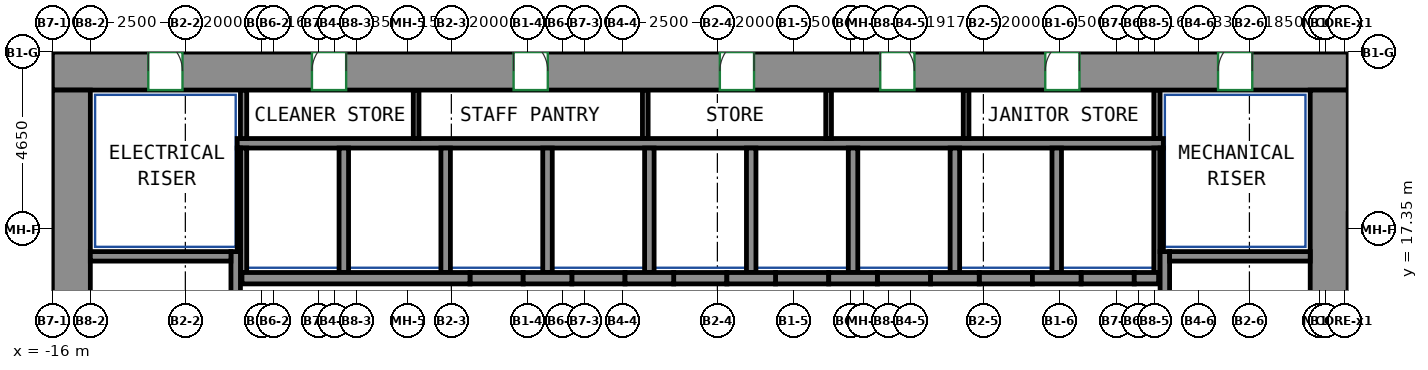
"""IFC4 building model, lengths in metres.
Left out: names, types, materials, properties, quantities, classifications, styles, units other than length and angle.
Written with IfcOpenShell. Run it as: python <this file> out.ifc"""

import sys

from ifc_helpers import new_model, si_unit, direction, frame, frame_2d, origin, place, context, subcontext, project, spatial, rectangle, extrude, source, transform, mapped, element, fill, save


model = new_model("IFC4")
c1 = context("Model", 3, precision=1e-05, world=origin(), true_north=direction((0.0, 1.0)))
c2 = subcontext(c1, "Body", "Model", "MODEL_VIEW")
j1 = project(units=[si_unit("LENGTHUNIT", "METRE"), si_unit("PLANEANGLEUNIT", "RADIAN")], contexts=[c1])
p1 = place(None, origin())
s1 = spatial("IfcSite", under=j1, at=p1, CompositionType="ELEMENT")
p2 = place(p1, origin())
s2 = spatial("IfcBuilding", under=s1, at=p2, CompositionType="ELEMENT")
p3 = place(p2, frame((0.0, 0.0, 95.2)))
s3 = spatial("IfcBuildingStorey", under=s2, at=p3, CompositionType="ELEMENT", Elevation=95.2)
m1 = source(origin(), c2, "Body", "SweptSolid", [
    extrude(rectangle(XDim=34.1, YDim=1.0, at=frame_2d((17.05, 0.0))), origin(), (0.0, 0.0, 1.0), 5.0),
])
p4 = place(p3, frame((-16.0, 21.5, 0.0), z_axis=(0.0, 0.0, 1.0), x_axis=(1.0, 0.0, 0.0)))
e1 = element("IfcWall", 1, at=p4, inside=s3, PredefinedType="SHEAR", context=c2, shape_type="MappedRepresentation", body=[
    mapped(m1, transform((0.0, 0.0, 0.0))),
])
p5 = place(p4, frame((6.831, 0.0, 0.0)))
e2 = element("IfcOpeningElement", 2, at=p5, cuts=e1, PredefinedType="OPENING", context=c2, shape_type="SweptSolid", body=[
    extrude(rectangle(XDim=0.9, YDim=2.1, at=frame_2d((0.45, 1.05))), frame((0.0, 0.51, 0.0), z_axis=(0.0, -1.0, 0.0), x_axis=(1.0, 0.0, 0.0)), (0.0, 0.0, 1.0), 1.02),
])
p6 = place(p4, frame((12.138, 0.0, 0.0)))
e3 = element("IfcOpeningElement", 3, at=p6, cuts=e1, PredefinedType="OPENING", context=c2, shape_type="SweptSolid", body=[
    extrude(rectangle(XDim=0.9, YDim=2.1, at=frame_2d((0.45, 1.05))), frame((0.0, 0.51, 0.0), z_axis=(0.0, -1.0, 0.0), x_axis=(1.0, 0.0, 0.0)), (0.0, 0.0, 1.0), 1.02),
])
p7 = place(p4, frame((17.565, 0.0, 0.0)))
e4 = element("IfcOpeningElement", 4, at=p7, cuts=e1, PredefinedType="OPENING", context=c2, shape_type="SweptSolid", body=[
    extrude(rectangle(XDim=0.9, YDim=2.1, at=frame_2d((0.45, 1.05))), frame((0.0, 0.51, 0.0), z_axis=(0.0, -1.0, 0.0), x_axis=(1.0, 0.0, 0.0)), (0.0, 0.0, 1.0), 1.02),
])
p8 = place(p4, frame((21.786, 0.0, 0.0)))
e5 = element("IfcOpeningElement", 5, at=p8, cuts=e1, PredefinedType="OPENING", context=c2, shape_type="SweptSolid", body=[
    extrude(rectangle(XDim=0.9, YDim=2.1, at=frame_2d((0.45, 1.05))), frame((0.0, 0.51, 0.0), z_axis=(0.0, -1.0, 0.0), x_axis=(1.0, 0.0, 0.0)), (0.0, 0.0, 1.0), 1.02),
])
p9 = place(p4, frame((26.127, 0.0, 0.0)))
e6 = element("IfcOpeningElement", 6, at=p9, cuts=e1, PredefinedType="OPENING", context=c2, shape_type="SweptSolid", body=[
    extrude(rectangle(XDim=0.9, YDim=2.1, at=frame_2d((0.45, 1.05))), frame((0.0, 0.51, 0.0), z_axis=(0.0, -1.0, 0.0), x_axis=(1.0, 0.0, 0.0)), (0.0, 0.0, 1.0), 1.02),
])
p10 = place(p4, frame((2.525, 0.0, 0.0)))
e7 = element("IfcOpeningElement", 7, at=p10, cuts=e1, PredefinedType="OPENING", context=c2, shape_type="SweptSolid", body=[
    extrude(rectangle(XDim=0.9, YDim=2.1, at=frame_2d((0.45, 1.05))), frame((0.0, 0.51, 0.0), z_axis=(0.0, -1.0, 0.0), x_axis=(1.0, 0.0, 0.0)), (0.0, 0.0, 1.0), 1.02),
])
p11 = place(p4, frame((30.675, 0.0, 0.0)))
e8 = element("IfcOpeningElement", 8, at=p11, cuts=e1, PredefinedType="OPENING", context=c2, shape_type="SweptSolid", body=[
    extrude(rectangle(XDim=0.9, YDim=2.1, at=frame_2d((0.45, 1.05))), frame((0.0, 0.51, 0.0), z_axis=(0.0, -1.0, 0.0), x_axis=(1.0, 0.0, 0.0)), (0.0, 0.0, 1.0), 1.02),
])
m2 = source(origin(), c2, "Body", "SweptSolid", [
    extrude(rectangle(XDim=12.0, YDim=1.0, at=frame_2d((6.0, 0.0))), origin(), (0.0, 0.0, 1.0), 5.0),
])
for number, where, z_axis, x_axis in (
    (9, (-15.5, 9.0, 0.0), (0.0, 0.0, 1.0), (0.0, 1.0, 0.0)),
    (10, (17.6, 9.0, 0.0), (0.0, 0.0, 1.0), (0.0, 1.0, 0.0)),
):
    element("IfcWall", number, at=place(p3, frame(where, z_axis=z_axis, x_axis=x_axis)), inside=s3, PredefinedType="SHEAR", context=c2, shape_type="MappedRepresentation", body=[
        mapped(m2, transform((0.0, 0.0, 0.0))),
    ])
m3 = source(origin(), c2, "Body", "SweptSolid", [
    extrude(rectangle(XDim=7.75, YDim=0.25, at=frame_2d((3.875, 0.0))), origin(), (0.0, 0.0, 1.0), 5.0),
])
p12 = place(p3, frame((-11.175, 9.0, 0.0), z_axis=(0.0, 0.0, 1.0), x_axis=(0.0, 1.0, 0.0)))
e11 = element("IfcWall", 11, at=p12, inside=s3, PredefinedType="SHEAR", context=c2, shape_type="MappedRepresentation", body=[
    mapped(m3, transform((0.0, 0.0, 0.0))),
])
m4 = source(origin(), c2, "Body", "SweptSolid", [
    extrude(rectangle(XDim=3.7, YDim=0.25, at=frame_2d((1.85, 0.0))), origin(), (0.0, 0.0, 1.0), 5.0),
])
p13 = place(p3, frame((-15.0, 16.625, 0.0), z_axis=(0.0, 0.0, 1.0), x_axis=(1.0, 0.0, 0.0)))
e12 = element("IfcWall", 12, at=p13, inside=s3, PredefinedType="SHEAR", context=c2, shape_type="MappedRepresentation", body=[
    mapped(m4, transform((0.0, 0.0, 0.0))),
])
p14 = place(p3, frame((13.275, 9.0, 0.0), z_axis=(0.0, 0.0, 1.0), x_axis=(0.0, 1.0, 0.0)))
e13 = element("IfcWall", 13, at=p14, inside=s3, PredefinedType="SHEAR", context=c2, shape_type="MappedRepresentation", body=[
    mapped(m3, transform((0.0, 0.0, 0.0))),
])
m5 = source(origin(), c2, "Body", "SweptSolid", [
    extrude(rectangle(XDim=3.7, YDim=0.25, at=frame_2d((1.85, 0.0))), origin(), (0.0, 0.0, 1.0), 5.0),
])
p15 = place(p3, frame((13.4, 16.625, 0.0), z_axis=(0.0, 0.0, 1.0), x_axis=(1.0, 0.0, 0.0)))
e14 = element("IfcWall", 14, at=p15, inside=s3, PredefinedType="SHEAR", context=c2, shape_type="MappedRepresentation", body=[
    mapped(m5, transform((0.0, 0.0, 0.0))),
])
m6 = source(origin(), c2, "Body", "SweptSolid", [
    extrude(rectangle(XDim=6.0, YDim=0.3, at=frame_2d((3.0, 0.0))), origin(), (0.0, 0.0, 1.0), 5.0),
])
p16 = place(p3, frame((-11.01, 16.05, 0.0), z_axis=(0.0, 0.0, 1.0), x_axis=(1.0, 0.0, 0.0)))
e15 = element("IfcWall", 15, at=p16, inside=s3, PredefinedType="SHEAR", context=c2, shape_type="MappedRepresentation", body=[
    mapped(m6, transform((0.0, 0.0, 0.0))),
])
m7 = source(origin(), c2, "Body", "SweptSolid", [
    extrude(rectangle(XDim=1.28, YDim=0.3, at=frame_2d((0.64, 0.0))), origin(), (0.0, 0.0, 1.0), 5.0),
])
for number, where, z_axis, x_axis in (
    (16, (-3.61, 16.05, 0.0), (0.0, 0.0, 1.0), (1.0, 0.0, 0.0)),
    (17, (-0.93, 16.05, 0.0), (0.0, 0.0, 1.0), (1.0, 0.0, 0.0)),
    (18, (1.75, 16.05, 0.0), (0.0, 0.0, 1.0), (1.0, 0.0, 0.0)),
    (19, (4.43, 16.05, 0.0), (0.0, 0.0, 1.0), (1.0, 0.0, 0.0)),
):
    element("IfcWall", number, at=place(p3, frame(where, z_axis=z_axis, x_axis=x_axis)), inside=s3, PredefinedType="SHEAR", context=c2, shape_type="MappedRepresentation", body=[
        mapped(m7, transform((0.0, 0.0, 0.0))),
    ])
m8 = source(origin(), c2, "Body", "SweptSolid", [
    extrude(rectangle(XDim=1.28, YDim=0.3, at=frame_2d((0.64, 0.0))), origin(), (0.0, 0.0, 1.0), 5.0),
])
p17 = place(p3, frame((7.11, 16.05, 0.0), z_axis=(0.0, 0.0, 1.0), x_axis=(1.0, 0.0, 0.0)))
e20 = element("IfcWall", 20, at=p17, inside=s3, PredefinedType="SHEAR", context=c2, shape_type="MappedRepresentation", body=[
    mapped(m8, transform((0.0, 0.0, 0.0))),
])
p18 = place(p3, frame((9.79, 16.05, 0.0), z_axis=(0.0, 0.0, 1.0), x_axis=(1.0, 0.0, 0.0)))
e21 = element("IfcWall", 21, at=p18, inside=s3, PredefinedType="SHEAR", context=c2, shape_type="MappedRepresentation", body=[
    mapped(m7, transform((0.0, 0.0, 0.0))),
])
m9 = source(origin(), c2, "Body", "SweptSolid", [
    extrude(rectangle(XDim=0.64, YDim=0.3, at=frame_2d((0.32, 0.0))), origin(), (0.0, 0.0, 1.0), 5.0),
])
p19 = place(p3, frame((12.47, 16.05, 0.0), z_axis=(0.0, 0.0, 1.0), x_axis=(1.0, 0.0, 0.0)))
e22 = element("IfcWall", 22, at=p19, inside=s3, PredefinedType="SHEAR", context=c2, shape_type="MappedRepresentation", body=[
    mapped(m9, transform((0.0, 0.0, 0.0))),
])
m10 = source(origin(), c2, "Body", "SweptSolid", [
    extrude(rectangle(XDim=1.4, YDim=0.3, at=frame_2d((0.7, 0.0))), origin(), (0.0, 0.0, 1.0), 5.0),
])
for number, where, z_axis, x_axis in (
    (23, (11.07, 16.05, 0.0), (0.0, 0.0, 1.0), (1.0, 0.0, 0.0)),
    (24, (-5.01, 16.05, 0.0), (0.0, 0.0, 1.0), (1.0, 0.0, 0.0)),
):
    element("IfcWall", number, at=place(p3, frame(where, z_axis=z_axis, x_axis=x_axis)), inside=s3, PredefinedType="PARTITIONING", context=c2, shape_type="MappedRepresentation", body=[
        mapped(m10, transform((0.0, 0.0, 0.0))),
    ])
m11 = source(origin(), c2, "Body", "SweptSolid", [
    extrude(rectangle(XDim=1.4, YDim=0.3, at=frame_2d((0.7, 0.0))), origin(), (0.0, 0.0, 1.0), 5.0),
])
p20 = place(p3, frame((-2.33, 16.05, 0.0), z_axis=(0.0, 0.0, 1.0), x_axis=(1.0, 0.0, 0.0)))
e25 = element("IfcWall", 25, at=p20, inside=s3, PredefinedType="PARTITIONING", context=c2, shape_type="MappedRepresentation", body=[
    mapped(m11, transform((0.0, 0.0, 0.0))),
])
for number, where, z_axis, x_axis in (
    (26, (0.35, 16.05, 0.0), (0.0, 0.0, 1.0), (1.0, 0.0, 0.0)),
    (27, (3.03, 16.05, 0.0), (0.0, 0.0, 1.0), (1.0, 0.0, 0.0)),
):
    element("IfcWall", number, at=place(p3, frame(where, z_axis=z_axis, x_axis=x_axis)), inside=s3, PredefinedType="PARTITIONING", context=c2, shape_type="MappedRepresentation", body=[
        mapped(m10, transform((0.0, 0.0, 0.0))),
    ])
for number, where, z_axis, x_axis in (
    (28, (5.71, 16.05, 0.0), (0.0, 0.0, 1.0), (1.0, 0.0, 0.0)),
    (29, (8.39, 16.05, 0.0), (0.0, 0.0, 1.0), (1.0, 0.0, 0.0)),
):
    element("IfcWall", number, at=place(p3, frame(where, z_axis=z_axis, x_axis=x_axis)), inside=s3, PredefinedType="PARTITIONING", context=c2, shape_type="MappedRepresentation", body=[
        mapped(m11, transform((0.0, 0.0, 0.0))),
    ])
m12 = source(origin(), c2, "Body", "SweptSolid", [
    extrude(rectangle(XDim=24.37, YDim=0.25, at=frame_2d((12.185, 0.0))), origin(), (0.0, 0.0, 1.0), 5.0),
])
p21 = place(p3, frame((-11.135, 19.6, 0.0), z_axis=(0.0, 0.0, 1.0), x_axis=(1.0, 0.0, 0.0)))
e30 = element("IfcWall", 30, at=p21, inside=s3, PredefinedType="PARTITIONING", context=c2, shape_type="MappedRepresentation", body=[
    mapped(m12, transform((0.0, 0.0, 0.0))),
])
m13 = source(origin(), c2, "Body", "SweptSolid", [
    extrude(rectangle(XDim=3.275, YDim=0.165, at=frame_2d((1.638, 0.0))), origin(), (0.0, 0.0, 1.0), 5.0),
])
p22 = place(p3, frame((13.067, 16.2, 0.0), z_axis=(0.0, 0.0, 1.0), x_axis=(0.0, 1.0, 0.0)))
e31 = element("IfcWall", 31, at=p22, inside=s3, PredefinedType="PARTITIONING", context=c2, shape_type="MappedRepresentation", body=[
    mapped(m13, transform((0.0, 0.0, 0.0))),
])
m14 = source(origin(), c2, "Body", "SweptSolid", [
    extrude(rectangle(XDim=1.275, YDim=0.165, at=frame_2d((0.637, 0.0))), origin(), (0.0, 0.0, 1.0), 5.0),
])
p23 = place(p3, frame((13.067, 19.725, 0.0), z_axis=(0.0, 0.0, 1.0), x_axis=(0.0, 1.0, 0.0)))
e32 = element("IfcWall", 32, at=p23, inside=s3, PredefinedType="PARTITIONING", context=c2, shape_type="MappedRepresentation", body=[
    mapped(m14, transform((0.0, 0.0, 0.0))),
])
p24 = place(p3, frame((-10.968, 16.2, 0.0), z_axis=(0.0, 0.0, 1.0), x_axis=(0.0, 1.0, 0.0)))
e33 = element("IfcWall", 33, at=p24, inside=s3, PredefinedType="PARTITIONING", context=c2, shape_type="MappedRepresentation", body=[
    mapped(m13, transform((0.0, 0.0, 0.0))),
])
p25 = place(p3, frame((-10.968, 19.725, 0.0), z_axis=(0.0, 0.0, 1.0), x_axis=(0.0, 1.0, 0.0)))
e34 = element("IfcWall", 34, at=p25, inside=s3, PredefinedType="PARTITIONING", context=c2, shape_type="MappedRepresentation", body=[
    mapped(m14, transform((0.0, 0.0, 0.0))),
])
m15 = source(origin(), c2, "Body", "SweptSolid", [
    extrude(rectangle(XDim=3.275, YDim=0.25, at=frame_2d((1.638, 0.0))), origin(), (0.0, 0.0, 1.0), 5.0),
])
p26 = place(p3, frame((10.43, 16.2, 0.0), z_axis=(0.0, 0.0, 1.0), x_axis=(0.0, 1.0, 0.0)))
e35 = element("IfcWall", 35, at=p26, inside=s3, PredefinedType="PARTITIONING", context=c2, shape_type="MappedRepresentation", body=[
    mapped(m15, transform((0.0, 0.0, 0.0))),
])
m16 = source(origin(), c2, "Body", "SweptSolid", [
    extrude(rectangle(XDim=2.725, YDim=0.085, at=frame_2d((1.363, 0.0))), origin(), (0.0, 0.0, 1.0), 5.0),
])
p27 = place(p3, frame((13.192, 16.75, 0.0), z_axis=(0.0, 0.0, 1.0), x_axis=(0.0, 1.0, 0.0)))
e36 = element("IfcWall", 36, at=p27, inside=s3, PredefinedType="PARTITIONING", context=c2, shape_type="MappedRepresentation", body=[
    mapped(m16, transform((0.0, 0.0, 0.0))),
])
for number, where, z_axis, x_axis in (
    (37, (2.39, 16.2, 0.0), (0.0, 0.0, 1.0), (0.0, 1.0, 0.0)),
    (38, (5.07, 16.2, 0.0), (0.0, 0.0, 1.0), (0.0, 1.0, 0.0)),
    (39, (7.75, 16.2, 0.0), (0.0, 0.0, 1.0), (0.0, 1.0, 0.0)),
    (40, (-0.29, 16.2, 0.0), (0.0, 0.0, 1.0), (0.0, 1.0, 0.0)),
):
    element("IfcWall", number, at=place(p3, frame(where, z_axis=z_axis, x_axis=x_axis)), inside=s3, PredefinedType="PARTITIONING", context=c2, shape_type="MappedRepresentation", body=[
        mapped(m15, transform((0.0, 0.0, 0.0))),
    ])
p28 = place(p3, frame((-11.093, 16.75, 0.0), z_axis=(0.0, 0.0, 1.0), x_axis=(0.0, 1.0, 0.0)))
e41 = element("IfcWall", 41, at=p28, inside=s3, PredefinedType="PARTITIONING", context=c2, shape_type="MappedRepresentation", body=[
    mapped(m16, transform((0.0, 0.0, 0.0))),
])
for number, where, z_axis, x_axis in (
    (42, (-2.97, 16.2, 0.0), (0.0, 0.0, 1.0), (0.0, 1.0, 0.0)),
    (43, (-5.65, 16.2, 0.0), (0.0, 0.0, 1.0), (0.0, 1.0, 0.0)),
    (44, (-8.33, 16.2, 0.0), (0.0, 0.0, 1.0), (0.0, 1.0, 0.0)),
):
    element("IfcWall", number, at=place(p3, frame(where, z_axis=z_axis, x_axis=x_axis)), inside=s3, PredefinedType="PARTITIONING", context=c2, shape_type="MappedRepresentation", body=[
        mapped(m15, transform((0.0, 0.0, 0.0))),
    ])
m17 = source(origin(), c2, "Body", "SweptSolid", [
    extrude(rectangle(XDim=1.275, YDim=0.15, at=frame_2d((0.637, 0.0))), origin(), (0.0, 0.0, 1.0), 5.0),
])
for number, where, z_axis, x_axis in (
    (45, (-6.427, 19.725, 0.0), (0.0, 0.0, 1.0), (0.0, 1.0, 0.0)),
    (46, (-0.397, 19.725, 0.0), (0.0, 0.0, 1.0), (0.0, 1.0, 0.0)),
    (47, (4.427, 19.725, 0.0), (0.0, 0.0, 1.0), (0.0, 1.0, 0.0)),
    (48, (8.045, 19.725, 0.0), (0.0, 0.0, 1.0), (0.0, 1.0, 0.0)),
):
    element("IfcWall", number, at=place(p3, frame(where, z_axis=z_axis, x_axis=x_axis)), inside=s3, PredefinedType="PARTITIONING", context=c2, shape_type="MappedRepresentation", body=[
        mapped(m17, transform((0.0, 0.0, 0.0))),
    ])
p29 = place(p5, origin())
e49 = element("IfcDoor", 49, at=p29, inside=s3, OperationType="SINGLE_SWING_RIGHT", PredefinedType="DOOR", context=c2, shape_type="SweptSolid", body=[
    extrude(rectangle(XDim=0.9, YDim=2.1, at=frame_2d((0.45, 1.05))), frame((0.0, -0.355, 0.0), z_axis=(0.0, -1.0, 0.0), x_axis=(1.0, 0.0, 0.0)), (0.0, 0.0, 1.0), 0.05),
])
fill(e2, e49)
p30 = place(p6, origin())
e50 = element("IfcDoor", 50, at=p30, inside=s3, OperationType="SINGLE_SWING_LEFT", PredefinedType="DOOR", context=c2, shape_type="SweptSolid", body=[
    extrude(rectangle(XDim=0.9, YDim=2.1, at=frame_2d((0.45, 1.05))), frame((0.0, -0.355, 0.0), z_axis=(0.0, -1.0, 0.0), x_axis=(1.0, 0.0, 0.0)), (0.0, 0.0, 1.0), 0.05),
])
fill(e3, e50)
p31 = place(p7, origin())
e51 = element("IfcDoor", 51, at=p31, inside=s3, OperationType="SINGLE_SWING_RIGHT", PredefinedType="DOOR", context=c2, shape_type="SweptSolid", body=[
    extrude(rectangle(XDim=0.9, YDim=2.1, at=frame_2d((0.45, 1.05))), frame((0.0, -0.355, 0.0), z_axis=(0.0, -1.0, 0.0), x_axis=(1.0, 0.0, 0.0)), (0.0, 0.0, 1.0), 0.05),
])
fill(e4, e51)
p32 = place(p8, origin())
e52 = element("IfcDoor", 52, at=p32, inside=s3, OperationType="SINGLE_SWING_LEFT", PredefinedType="DOOR", context=c2, shape_type="SweptSolid", body=[
    extrude(rectangle(XDim=0.9, YDim=2.1, at=frame_2d((0.45, 1.05))), frame((0.0, -0.355, 0.0), z_axis=(0.0, -1.0, 0.0), x_axis=(1.0, 0.0, 0.0)), (0.0, 0.0, 1.0), 0.05),
])
fill(e5, e52)
p33 = place(p9, origin())
e53 = element("IfcDoor", 53, at=p33, inside=s3, OperationType="SINGLE_SWING_RIGHT", PredefinedType="DOOR", context=c2, shape_type="SweptSolid", body=[
    extrude(rectangle(XDim=0.9, YDim=2.1, at=frame_2d((0.45, 1.05))), frame((0.0, -0.355, 0.0), z_axis=(0.0, -1.0, 0.0), x_axis=(1.0, 0.0, 0.0)), (0.0, 0.0, 1.0), 0.05),
])
fill(e6, e53)
p34 = place(p10, origin())
e54 = element("IfcDoor", 54, at=p34, inside=s3, OperationType="SINGLE_SWING_LEFT", PredefinedType="DOOR", context=c2, shape_type="SweptSolid", body=[
    extrude(rectangle(XDim=0.9, YDim=2.1, at=frame_2d((0.45, 1.05))), frame((0.0, -0.355, 0.0), z_axis=(0.0, -1.0, 0.0), x_axis=(1.0, 0.0, 0.0)), (0.0, 0.0, 1.0), 0.05),
])
fill(e7, e54)
p35 = place(p11, origin())
e55 = element("IfcDoor", 55, at=p35, inside=s3, OperationType="SINGLE_SWING_RIGHT", PredefinedType="DOOR", context=c2, shape_type="SweptSolid", body=[
    extrude(rectangle(XDim=0.9, YDim=2.1, at=frame_2d((0.45, 1.05))), frame((0.0, -0.355, 0.0), z_axis=(0.0, -1.0, 0.0), x_axis=(1.0, 0.0, 0.0)), (0.0, 0.0, 1.0), 0.05),
])
fill(e8, e55)
save(model, sys.argv[1])
